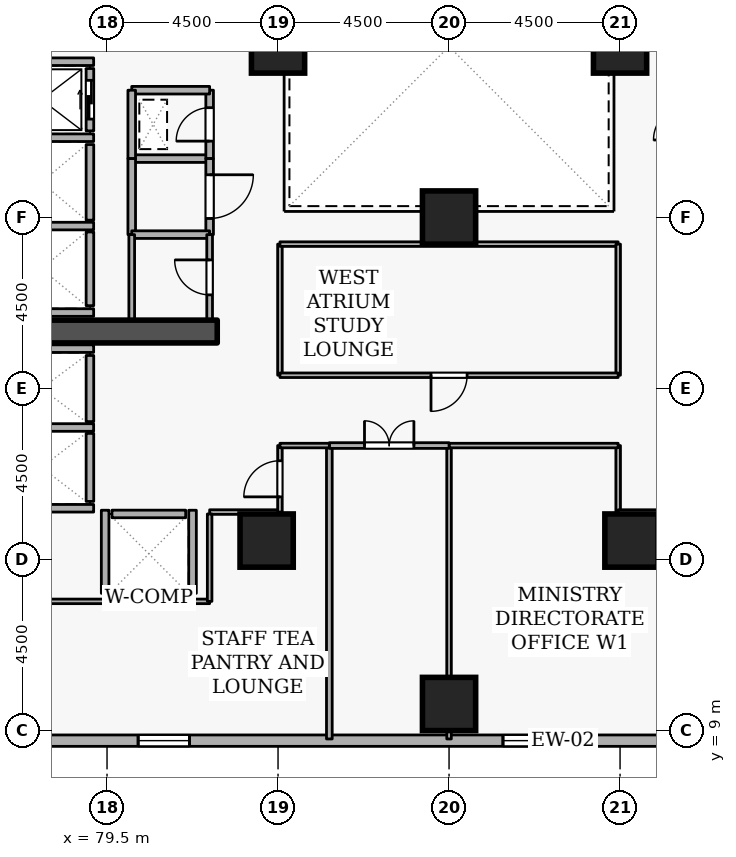
"""IFC4 building model, lengths in metres.
Left out: names, types, materials, properties, quantities, classifications, styles, units other than length and angle.
Written with IfcOpenShell. Run it as: python <this file> out.ifc"""

import sys

from ifc_helpers import new_model, si_unit, direction, frame, frame_2d, origin, origin_2d, place, context, subcontext, project, spatial, rectangle, extrude, element, fill, save


model = new_model("IFC4")
c1 = context("Model", 3, precision=1e-05, world=origin(), true_north=direction((0.0, 1.0)))
c2 = subcontext(c1, "Body", "Model", "MODEL_VIEW")
j1 = project(units=[si_unit("LENGTHUNIT", "METRE"), si_unit("PLANEANGLEUNIT", "RADIAN")], contexts=[c1])
p1 = place(None, origin())
s1 = spatial("IfcSite", under=j1, at=p1, CompositionType="ELEMENT")
p2 = place(p1, origin())
s2 = spatial("IfcBuilding", under=s1, at=p2, CompositionType="ELEMENT")
p3 = place(p2, frame((0.0, 0.0, 68.1)))
s3 = spatial("IfcBuildingStorey", under=s2, at=p3, CompositionType="ELEMENT", Elevation=68.1)
p4 = place(p3, frame((76.7, 19.5, 0.0), z_axis=(0.0, 0.0, 1.0), x_axis=(1.0, 0.0, 0.0)))
e1 = element("IfcWall", 1, at=p4, inside=s3, PredefinedType="SHEAR", context=c2, shape_type="SweptSolid", body=[
    extrude(rectangle(XDim=5.7, YDim=0.6, at=frame_2d((2.85, 0.0))), origin(), (0.0, 0.0, 1.0), 3.6),
])
for number, where, z_axis, x_axis in (
    (2, (88.5, 9.7, 0.0), (0.0, 0.0, 1.0), (1.0, 0.0, 0.0)),
    (3, (93.3, 14.0, 0.0), (0.0, 0.0, 1.0), (1.0, 0.0, 0.0)),
    (4, (83.7, 14.0, 0.0), (0.0, 0.0, 1.0), (1.0, 0.0, 0.0)),
    (5, (93.0, 27.0, 0.0), (0.0, 0.0, 1.0), (1.0, 0.0, 0.0)),
    (6, (84.0, 27.0, 0.0), (0.0, 0.0, 1.0), (1.0, 0.0, 0.0)),
    (7, (88.5, 22.5, 0.0), (0.0, 0.0, 1.0), (1.0, 0.0, 0.0)),
):
    element("IfcColumn", number, at=place(p3, frame(where, z_axis=z_axis, x_axis=x_axis)), inside=s3, PredefinedType="COLUMN", context=c2, shape_type="SweptSolid", body=[
        extrude(rectangle(XDim=1.4, YDim=1.4, at=origin_2d()), origin(), (0.0, 0.0, 1.0), 3.6),
    ])
p5 = place(p3, frame((72.819, 8.735, 0.0), z_axis=(0.0, 0.0, 1.0), x_axis=(1.0, 0.0, 0.0)))
e8 = element("IfcWall", 8, at=p5, inside=s3, PredefinedType="STANDARD", context=c2, shape_type="SweptSolid", body=[
    extrude(rectangle(XDim=37.362, YDim=0.3, at=frame_2d((18.681, 0.0))), origin(), (0.0, 0.0, 1.0), 2.66),
])
p6 = place(p5, frame((7.5, 0.0, 0.72)))
e9 = element("IfcOpeningElement", 9, at=p6, cuts=e8, PredefinedType="OPENING", context=c2, shape_type="SweptSolid", body=[
    extrude(rectangle(XDim=1.35, YDim=1.05, at=frame_2d((0.675, 0.525))), frame((0.0, 0.16, 0.0), z_axis=(0.0, -1.0, 0.0), x_axis=(1.0, 0.0, 0.0)), (0.0, 0.0, 1.0), 0.32),
])
p7 = place(p5, frame((17.1, 0.0, 0.72)))
e10 = element("IfcOpeningElement", 10, at=p7, cuts=e8, PredefinedType="OPENING", context=c2, shape_type="SweptSolid", body=[
    extrude(rectangle(XDim=1.35, YDim=1.05, at=frame_2d((0.675, 0.525))), frame((0.0, 0.16, 0.0), z_axis=(0.0, -1.0, 0.0), x_axis=(1.0, 0.0, 0.0)), (0.0, 0.0, 1.0), 0.32),
])
p8 = place(p5, frame((21.9, 0.0, 0.72)))
e11 = element("IfcOpeningElement", 11, at=p8, cuts=e8, PredefinedType="OPENING", context=c2, shape_type="SweptSolid", body=[
    extrude(rectangle(XDim=1.35, YDim=1.05, at=frame_2d((0.675, 0.525))), frame((0.0, 0.16, 0.0), z_axis=(0.0, -1.0, 0.0), x_axis=(1.0, 0.0, 0.0)), (0.0, 0.0, 1.0), 0.32),
])
p9 = place(p3, frame((79.05, 24.78, 0.0), z_axis=(0.0, 0.0, 1.0), x_axis=(0.0, 1.0, 0.0)))
e12 = element("IfcWall", 12, at=p9, inside=s3, PredefinedType="STANDARD", context=c2, shape_type="SweptSolid", body=[
    extrude(rectangle(XDim=1.64, YDim=0.2, at=frame_2d((0.82, 0.0))), origin(), (0.0, 0.0, 1.0), 3.26),
])
p10 = place(p9, frame((0.31, 0.0, 0.0)))
e13 = element("IfcOpeningElement", 13, at=p10, cuts=e12, PredefinedType="OPENING", context=c2, shape_type="SweptSolid", body=[
    extrude(rectangle(XDim=1.02, YDim=2.06, at=frame_2d((0.51, 1.03))), frame((0.0, 0.11, 0.0), z_axis=(0.0, -1.0, 0.0), x_axis=(1.0, 0.0, 0.0)), (0.0, 0.0, 1.0), 0.22),
])
p11 = place(p3, frame((79.05, 22.43, 0.0), z_axis=(0.0, 0.0, 1.0), x_axis=(0.0, 1.0, 0.0)))
e14 = element("IfcWall", 14, at=p11, inside=s3, PredefinedType="STANDARD", context=c2, shape_type="SweptSolid", body=[
    extrude(rectangle(XDim=1.99, YDim=0.2, at=frame_2d((0.995, 0.0))), origin(), (0.0, 0.0, 1.0), 3.26),
])
p12 = place(p3, frame((79.05, 20.18, 0.0), z_axis=(0.0, 0.0, 1.0), x_axis=(0.0, 1.0, 0.0)))
e15 = element("IfcWall", 15, at=p12, inside=s3, PredefinedType="STANDARD", context=c2, shape_type="SweptSolid", body=[
    extrude(rectangle(XDim=1.94, YDim=0.2, at=frame_2d((0.97, 0.0))), origin(), (0.0, 0.0, 1.0), 3.26),
])
p13 = place(p3, frame((79.05, 17.13, 0.0), z_axis=(0.0, 0.0, 1.0), x_axis=(0.0, 1.0, 0.0)))
e16 = element("IfcWall", 16, at=p13, inside=s3, PredefinedType="STANDARD", context=c2, shape_type="SweptSolid", body=[
    extrude(rectangle(XDim=1.74, YDim=0.2, at=frame_2d((0.87, 0.0))), origin(), (0.0, 0.0, 1.0), 3.26),
])
p14 = place(p3, frame((79.05, 15.03, 0.0), z_axis=(0.0, 0.0, 1.0), x_axis=(0.0, 1.0, 0.0)))
e17 = element("IfcWall", 17, at=p14, inside=s3, PredefinedType="STANDARD", context=c2, shape_type="SweptSolid", body=[
    extrude(rectangle(XDim=1.79, YDim=0.2, at=frame_2d((0.895, 0.0))), origin(), (0.0, 0.0, 1.0), 3.26),
])
p15 = place(p3, frame((79.63, 14.7, 0.0), z_axis=(0.0, 0.0, 1.0), x_axis=(1.0, 0.0, 0.0)))
e18 = element("IfcWall", 18, at=p15, inside=s3, PredefinedType="STANDARD", context=c2, shape_type="SweptSolid", body=[
    extrude(rectangle(XDim=1.94, YDim=0.2, at=frame_2d((0.97, 0.0))), origin(), (0.0, 0.0, 1.0), 3.26),
])
for number, where, z_axis, x_axis in (
    (19, (76.712, 26.6, 0.0), (0.0, 0.0, 1.0), (1.0, 0.0, 0.0)),
    (20, (76.712, 24.6, 0.0), (0.0, 0.0, 1.0), (1.0, 0.0, 0.0)),
    (21, (76.712, 22.275, 0.0), (0.0, 0.0, 1.0), (1.0, 0.0, 0.0)),
    (22, (76.712, 20.0, 0.0), (0.0, 0.0, 1.0), (1.0, 0.0, 0.0)),
):
    element("IfcWall", number, at=place(p3, frame(where, z_axis=z_axis, x_axis=x_axis)), inside=s3, PredefinedType="STANDARD", context=c2, shape_type="SweptSolid", body=[
        extrude(rectangle(XDim=2.436, YDim=0.2, at=frame_2d((1.218, 0.0))), origin(), (0.0, 0.0, 1.0), 3.26),
    ])
p16 = place(p3, frame((76.402, 19.05, 0.0), z_axis=(0.0, 0.0, 1.0), x_axis=(1.0, 0.0, 0.0)))
e23 = element("IfcWall", 23, at=p16, inside=s3, PredefinedType="STANDARD", context=c2, shape_type="SweptSolid", body=[
    extrude(rectangle(XDim=2.746, YDim=0.2, at=frame_2d((1.373, 0.0))), origin(), (0.0, 0.0, 1.0), 2.465),
])
p17 = place(p3, frame((76.402, 16.975, 0.0), z_axis=(0.0, 0.0, 1.0), x_axis=(1.0, 0.0, 0.0)))
e24 = element("IfcWall", 24, at=p17, inside=s3, PredefinedType="STANDARD", context=c2, shape_type="SweptSolid", body=[
    extrude(rectangle(XDim=2.746, YDim=0.2, at=frame_2d((1.373, 0.0))), origin(), (0.0, 0.0, 1.0), 3.26),
])
p18 = place(p3, frame((76.512, 14.85, 0.0), z_axis=(0.0, 0.0, 1.0), x_axis=(1.0, 0.0, 0.0)))
e25 = element("IfcWall", 25, at=p18, inside=s3, PredefinedType="STANDARD", context=c2, shape_type="SweptSolid", body=[
    extrude(rectangle(XDim=2.636, YDim=0.2, at=frame_2d((1.318, 0.0))), origin(), (0.0, 0.0, 1.0), 3.26),
])
p19 = place(p3, frame((79.452, 12.5, 0.0), z_axis=(0.0, 0.0, 1.0), x_axis=(1.0, 0.0, 0.0)))
e26 = element("IfcWall", 26, at=p19, inside=s3, PredefinedType="STANDARD", context=c2, shape_type="SweptSolid", body=[
    extrude(rectangle(XDim=2.296, YDim=0.2, at=frame_2d((1.148, 0.0))), origin(), (0.0, 0.0, 1.0), 3.26),
])
for number, where, z_axis, x_axis in (
    (27, (81.75, 12.612, 0.0), (0.0, 0.0, 1.0), (0.0, 1.0, 0.0)),
    (28, (79.45, 12.612, 0.0), (0.0, 0.0, 1.0), (0.0, 1.0, 0.0)),
):
    element("IfcWall", number, at=place(p3, frame(where, z_axis=z_axis, x_axis=x_axis)), inside=s3, PredefinedType="STANDARD", context=c2, shape_type="SweptSolid", body=[
        extrude(rectangle(XDim=2.186, YDim=0.2, at=frame_2d((1.093, 0.0))), origin(), (0.0, 0.0, 1.0), 3.26),
    ])
p20 = place(p3, frame((80.15, 24.05, 0.0), z_axis=(0.0, 0.0, 1.0), x_axis=(1.0, 0.0, 0.0)))
e29 = element("IfcWall", 29, at=p20, inside=s3, PredefinedType="STANDARD", context=c2, shape_type="SweptSolid", body=[
    extrude(rectangle(XDim=2.05, YDim=0.2, at=frame_2d((1.025, 0.0))), origin(), (0.0, 0.0, 1.0), 3.26),
])
p21 = place(p3, frame((82.2, 24.05, 0.0), z_axis=(0.0, 0.0, 1.0), x_axis=(0.0, 1.0, 0.0)))
e30 = element("IfcWall", 30, at=p21, inside=s3, PredefinedType="STANDARD", context=c2, shape_type="SweptSolid", body=[
    extrude(rectangle(XDim=1.8, YDim=0.2, at=frame_2d((0.9, 0.0))), origin(), (0.0, 0.0, 1.0), 3.26),
])
p22 = place(p21, frame((0.46, 0.0, 0.0)))
e31 = element("IfcOpeningElement", 31, at=p22, cuts=e30, PredefinedType="OPENING", context=c2, shape_type="SweptSolid", body=[
    extrude(rectangle(XDim=0.88, YDim=2.04, at=frame_2d((0.44, 1.02))), frame((0.0, 0.11, 0.0), z_axis=(0.0, -1.0, 0.0), x_axis=(1.0, 0.0, 0.0)), (0.0, 0.0, 1.0), 0.22),
])
p23 = place(p3, frame((82.2, 25.85, 0.0), z_axis=(0.0, 0.0, 1.0), x_axis=(-1.0, 0.0, 0.0)))
e32 = element("IfcWall", 32, at=p23, inside=s3, PredefinedType="STANDARD", context=c2, shape_type="SweptSolid", body=[
    extrude(rectangle(XDim=2.05, YDim=0.2, at=frame_2d((1.025, 0.0))), origin(), (0.0, 0.0, 1.0), 3.26),
])
p24 = place(p3, frame((80.15, 25.85, 0.0), z_axis=(0.0, 0.0, 1.0), x_axis=(0.0, -1.0, 0.0)))
e33 = element("IfcWall", 33, at=p24, inside=s3, PredefinedType="STANDARD", context=c2, shape_type="SweptSolid", body=[
    extrude(rectangle(XDim=1.8, YDim=0.2, at=frame_2d((0.9, 0.0))), origin(), (0.0, 0.0, 1.0), 3.26),
])
p25 = place(p3, frame((80.15, 22.05, 0.0), z_axis=(0.0, 0.0, 1.0), x_axis=(0.0, 1.0, 0.0)))
e34 = element("IfcWall", 34, at=p25, inside=s3, PredefinedType="STANDARD", context=c2, shape_type="SweptSolid", body=[
    extrude(rectangle(XDim=2.0, YDim=0.2, at=frame_2d((1.0, 0.0))), origin(), (0.0, 0.0, 1.0), 3.26),
])
p26 = place(p3, frame((82.2, 24.05, 0.0), z_axis=(0.0, 0.0, 1.0), x_axis=(0.0, -1.0, 0.0)))
e35 = element("IfcWall", 35, at=p26, inside=s3, PredefinedType="STANDARD", context=c2, shape_type="SweptSolid", body=[
    extrude(rectangle(XDim=2.0, YDim=0.2, at=frame_2d((1.0, 0.0))), origin(), (0.0, 0.0, 1.0), 3.26),
])
p27 = place(p26, frame((0.425, 0.0, 0.0)))
e36 = element("IfcOpeningElement", 36, at=p27, cuts=e35, PredefinedType="OPENING", context=c2, shape_type="SweptSolid", body=[
    extrude(rectangle(XDim=1.15, YDim=2.1, at=frame_2d((0.575, 1.05))), frame((0.0, 0.11, 0.0), z_axis=(0.0, -1.0, 0.0), x_axis=(1.0, 0.0, 0.0)), (0.0, 0.0, 1.0), 0.22),
])
p28 = place(p3, frame((82.2, 22.05, 0.0), z_axis=(0.0, 0.0, 1.0), x_axis=(-1.0, 0.0, 0.0)))
e37 = element("IfcWall", 37, at=p28, inside=s3, PredefinedType="STANDARD", context=c2, shape_type="SweptSolid", body=[
    extrude(rectangle(XDim=2.05, YDim=0.2, at=frame_2d((1.025, 0.0))), origin(), (0.0, 0.0, 1.0), 3.26),
])
p29 = place(p3, frame((82.2, 19.8, 0.0), z_axis=(0.0, 0.0, 1.0), x_axis=(0.0, 1.0, 0.0)))
e38 = element("IfcWall", 38, at=p29, inside=s3, PredefinedType="PARTITIONING", context=c2, shape_type="SweptSolid", body=[
    extrude(rectangle(XDim=2.25, YDim=0.15, at=frame_2d((1.125, 0.0))), origin(), (0.0, 0.0, 1.0), 3.26),
])
p30 = place(p29, frame((0.665, 0.0, 0.0)))
e39 = element("IfcOpeningElement", 39, at=p30, cuts=e38, PredefinedType="OPENING", context=c2, shape_type="SweptSolid", body=[
    extrude(rectangle(XDim=0.92, YDim=2.08, at=frame_2d((0.46, 1.04))), frame((0.0, 0.085, 0.0), z_axis=(0.0, -1.0, 0.0), x_axis=(1.0, 0.0, 0.0)), (0.0, 0.0, 1.0), 0.17),
])
p31 = place(p3, frame((80.15, 22.05, 0.0), z_axis=(0.0, 0.0, 1.0), x_axis=(0.0, -1.0, 0.0)))
e40 = element("IfcWall", 40, at=p31, inside=s3, PredefinedType="PARTITIONING", context=c2, shape_type="SweptSolid", body=[
    extrude(rectangle(XDim=2.25, YDim=0.15, at=frame_2d((1.125, 0.0))), origin(), (0.0, 0.0, 1.0), 3.26),
])
p32 = place(p3, frame((92.95, 16.5, 0.0), z_axis=(0.0, 0.0, 1.0), x_axis=(0.0, -1.0, 0.0)))
e41 = element("IfcWall", 41, at=p32, inside=s3, PredefinedType="PARTITIONING", context=c2, shape_type="SweptSolid", body=[
    extrude(rectangle(XDim=1.75, YDim=0.12, at=frame_2d((0.875, 0.0))), origin(), (0.0, 0.0, 1.0), 3.26),
])
p33 = place(p3, frame((92.95, 14.75, 0.0), z_axis=(0.0, 0.0, 1.0), x_axis=(1.0, 0.0, 0.0)))
e42 = element("IfcWall", 42, at=p33, inside=s3, PredefinedType="PARTITIONING", context=c2, shape_type="SweptSolid", body=[
    extrude(rectangle(XDim=1.85, YDim=0.12, at=frame_2d((0.925, 0.0))), origin(), (0.0, 0.0, 1.0), 3.26),
])
p34 = place(p3, frame((88.5, 8.78, 0.0), z_axis=(0.0, 0.0, 1.0), x_axis=(0.0, 1.0, 0.0)))
e43 = element("IfcWall", 43, at=p34, inside=s3, PredefinedType="PARTITIONING", context=c2, shape_type="SweptSolid", body=[
    extrude(rectangle(XDim=7.72, YDim=0.12, at=frame_2d((3.86, 0.0))), origin(), (0.0, 0.0, 1.0), 2.798),
])
p35 = place(p3, frame((88.5, 16.5, 0.0), z_axis=(0.0, 0.0, 1.0), x_axis=(1.0, 0.0, 0.0)))
e44 = element("IfcWall", 44, at=p35, inside=s3, PredefinedType="PARTITIONING", context=c2, shape_type="SweptSolid", body=[
    extrude(rectangle(XDim=4.45, YDim=0.12, at=frame_2d((2.225, 0.0))), origin(), (0.0, 0.0, 1.0), 3.26),
])
p36 = place(p3, frame((85.35, 8.78, 0.0), z_axis=(0.0, 0.0, 1.0), x_axis=(0.0, 1.0, 0.0)))
e45 = element("IfcWall", 45, at=p36, inside=s3, PredefinedType="PARTITIONING", context=c2, shape_type="SweptSolid", body=[
    extrude(rectangle(XDim=7.72, YDim=0.15, at=frame_2d((3.86, 0.0))), origin(), (0.0, 0.0, 1.0), 3.26),
])
p37 = place(p3, frame((85.35, 16.5, 0.0), z_axis=(0.0, 0.0, 1.0), x_axis=(1.0, 0.0, 0.0)))
e46 = element("IfcWall", 46, at=p37, inside=s3, PredefinedType="PARTITIONING", context=c2, shape_type="SweptSolid", body=[
    extrude(rectangle(XDim=3.15, YDim=0.15, at=frame_2d((1.575, 0.0))), origin(), (0.0, 0.0, 1.0), 3.26),
])
p38 = place(p37, frame((0.925, 0.0, 0.0)))
e47 = element("IfcOpeningElement", 47, at=p38, cuts=e46, PredefinedType="OPENING", context=c2, shape_type="SweptSolid", body=[
    extrude(rectangle(XDim=1.3, YDim=2.12, at=frame_2d((0.65, 1.06))), frame((0.0, 0.085, 0.0), z_axis=(0.0, -1.0, 0.0), x_axis=(1.0, 0.0, 0.0)), (0.0, 0.0, 1.0), 0.17),
])
p39 = place(p3, frame((82.2, 14.75, 0.0), z_axis=(0.0, 0.0, 1.0), x_axis=(1.0, 0.0, 0.0)))
e48 = element("IfcWall", 48, at=p39, inside=s3, PredefinedType="PARTITIONING", context=c2, shape_type="SweptSolid", body=[
    extrude(rectangle(XDim=1.85, YDim=0.12, at=frame_2d((0.925, 0.0))), origin(), (0.0, 0.0, 1.0), 3.26),
])
p40 = place(p3, frame((84.05, 14.75, 0.0), z_axis=(0.0, 0.0, 1.0), x_axis=(0.0, 1.0, 0.0)))
e49 = element("IfcWall", 49, at=p40, inside=s3, PredefinedType="PARTITIONING", context=c2, shape_type="SweptSolid", body=[
    extrude(rectangle(XDim=1.75, YDim=0.12, at=frame_2d((0.875, 0.0))), origin(), (0.0, 0.0, 1.0), 3.26),
])
p41 = place(p40, frame((0.4, 0.0, 0.0)))
e50 = element("IfcOpeningElement", 50, at=p41, cuts=e49, PredefinedType="OPENING", context=c2, shape_type="SweptSolid", body=[
    extrude(rectangle(XDim=0.95, YDim=2.1, at=frame_2d((0.475, 1.05))), frame((0.0, 0.07, 0.0), z_axis=(0.0, -1.0, 0.0), x_axis=(1.0, 0.0, 0.0)), (0.0, 0.0, 1.0), 0.14),
])
p42 = place(p3, frame((84.05, 16.5, 0.0), z_axis=(0.0, 0.0, 1.0), x_axis=(1.0, 0.0, 0.0)))
e51 = element("IfcWall", 51, at=p42, inside=s3, PredefinedType="PARTITIONING", context=c2, shape_type="SweptSolid", body=[
    extrude(rectangle(XDim=1.3, YDim=0.12, at=frame_2d((0.65, 0.0))), origin(), (0.0, 0.0, 1.0), 3.26),
])
p43 = place(p3, frame((70.28, 12.4, 0.0), z_axis=(0.0, 0.0, 1.0), x_axis=(1.0, 0.0, 0.0)))
e52 = element("IfcWall", 52, at=p43, inside=s3, PredefinedType="PARTITIONING", context=c2, shape_type="SweptSolid", body=[
    extrude(rectangle(XDim=9.172, YDim=0.12, at=frame_2d((4.586, 0.0))), origin(), (0.0, 0.0, 1.0), 3.26),
])
p44 = place(p3, frame((81.748, 12.4, 0.0), z_axis=(0.0, 0.0, 1.0), x_axis=(1.0, 0.0, 0.0)))
e53 = element("IfcWall", 53, at=p44, inside=s3, PredefinedType="PARTITIONING", context=c2, shape_type="SweptSolid", body=[
    extrude(rectangle(XDim=0.452, YDim=0.12, at=frame_2d((0.226, 0.0))), origin(), (0.0, 0.0, 1.0), 3.26),
])
p45 = place(p3, frame((82.2, 12.4, 0.0), z_axis=(0.0, 0.0, 1.0), x_axis=(0.0, 1.0, 0.0)))
e54 = element("IfcWall", 54, at=p45, inside=s3, PredefinedType="PARTITIONING", context=c2, shape_type="SweptSolid", body=[
    extrude(rectangle(XDim=2.3, YDim=0.12, at=frame_2d((1.15, 0.0))), origin(), (0.0, 0.0, 1.0), 3.26),
])
p46 = place(p3, frame((84.05, 18.35, 0.0), z_axis=(0.0, 0.0, 1.0), x_axis=(0.0, 1.0, 0.0)))
e55 = element("IfcWall", 55, at=p46, inside=s3, PredefinedType="PARTITIONING", context=c2, shape_type="SweptSolid", body=[
    extrude(rectangle(XDim=3.45, YDim=0.12, at=frame_2d((1.725, 0.0))), origin(), (0.0, 0.0, 1.0), 3.26),
])
p47 = place(p3, frame((84.05, 21.8, 0.0), z_axis=(0.0, 0.0, 1.0), x_axis=(1.0, 0.0, 0.0)))
e56 = element("IfcWall", 56, at=p47, inside=s3, PredefinedType="PARTITIONING", context=c2, shape_type="SweptSolid", body=[
    extrude(rectangle(XDim=8.9, YDim=0.12, at=frame_2d((4.45, 0.0))), origin(), (0.0, 0.0, 1.0), 3.26),
])
p48 = place(p3, frame((92.95, 21.8, 0.0), z_axis=(0.0, 0.0, 1.0), x_axis=(0.0, -1.0, 0.0)))
e57 = element("IfcWall", 57, at=p48, inside=s3, PredefinedType="PARTITIONING", context=c2, shape_type="SweptSolid", body=[
    extrude(rectangle(XDim=3.45, YDim=0.12, at=frame_2d((1.725, 0.0))), origin(), (0.0, 0.0, 1.0), 3.26),
])
p49 = place(p3, frame((92.95, 18.35, 0.0), z_axis=(0.0, 0.0, 1.0), x_axis=(-1.0, 0.0, 0.0)))
e58 = element("IfcWall", 58, at=p49, inside=s3, PredefinedType="PARTITIONING", context=c2, shape_type="SweptSolid", body=[
    extrude(rectangle(XDim=8.9, YDim=0.12, at=frame_2d((4.45, 0.0))), origin(), (0.0, 0.0, 1.0), 3.26),
])
p50 = place(p49, frame((3.975, 0.0, 0.0)))
e59 = element("IfcOpeningElement", 59, at=p50, cuts=e58, PredefinedType="OPENING", context=c2, shape_type="SweptSolid", body=[
    extrude(rectangle(XDim=0.95, YDim=2.1, at=frame_2d((0.475, 1.05))), frame((0.0, 0.07, 0.0), z_axis=(0.0, -1.0, 0.0), x_axis=(1.0, 0.0, 0.0)), (0.0, 0.0, 1.0), 0.14),
])
p51 = place(p6, origin())
e60 = element("IfcWindow", 60, at=p51, inside=s3, PartitioningType="SINGLE_PANEL", PredefinedType="WINDOW", context=c2, shape_type="SweptSolid", body=[
    extrude(rectangle(XDim=1.35, YDim=1.05, at=frame_2d((0.675, 0.525))), frame((0.0, 0.03, 0.0), z_axis=(0.0, -1.0, 0.0), x_axis=(1.0, 0.0, 0.0)), (0.0, 0.0, 1.0), 0.06),
])
fill(e9, e60)
p52 = place(p7, origin())
e61 = element("IfcWindow", 61, at=p52, inside=s3, PartitioningType="SINGLE_PANEL", PredefinedType="WINDOW", context=c2, shape_type="SweptSolid", body=[
    extrude(rectangle(XDim=1.35, YDim=1.05, at=frame_2d((0.675, 0.525))), frame((0.0, 0.03, 0.0), z_axis=(0.0, -1.0, 0.0), x_axis=(1.0, 0.0, 0.0)), (0.0, 0.0, 1.0), 0.06),
])
fill(e10, e61)
p53 = place(p10, origin())
e62 = element("IfcDoor", 62, at=p53, inside=s3, OperationType="SLIDING_TO_LEFT", PredefinedType="DOOR", context=c2, shape_type="SweptSolid", body=[
    extrude(rectangle(XDim=1.02, YDim=2.06, at=frame_2d((0.51, 1.03))), frame((0.0, 0.025, 0.0), z_axis=(0.0, -1.0, 0.0), x_axis=(1.0, 0.0, 0.0)), (0.0, 0.0, 1.0), 0.05),
])
fill(e13, e62)
p54 = place(p22, origin())
e63 = element("IfcDoor", 63, at=p54, inside=s3, OperationType="SINGLE_SWING_LEFT", PredefinedType="DOOR", context=c2, shape_type="SweptSolid", body=[
    extrude(rectangle(XDim=0.88, YDim=2.04, at=frame_2d((0.44, 1.02))), frame((0.0, 0.025, 0.0), z_axis=(0.0, -1.0, 0.0), x_axis=(1.0, 0.0, 0.0)), (0.0, 0.0, 1.0), 0.05),
])
fill(e31, e63)
p55 = place(p30, origin())
e64 = element("IfcDoor", 64, at=p55, inside=s3, OperationType="SINGLE_SWING_RIGHT", PredefinedType="DOOR", context=c2, shape_type="SweptSolid", body=[
    extrude(rectangle(XDim=0.92, YDim=2.08, at=frame_2d((0.46, 1.04))), frame((0.0, 0.025, 0.0), z_axis=(0.0, -1.0, 0.0), x_axis=(1.0, 0.0, 0.0)), (0.0, 0.0, 1.0), 0.05),
])
fill(e39, e64)
p56 = place(p27, origin())
e65 = element("IfcDoor", 65, at=p56, inside=s3, OperationType="SINGLE_SWING_LEFT", PredefinedType="DOOR", context=c2, shape_type="SweptSolid", body=[
    extrude(rectangle(XDim=1.15, YDim=2.1, at=frame_2d((0.575, 1.05))), frame((0.0, 0.025, 0.0), z_axis=(0.0, -1.0, 0.0), x_axis=(1.0, 0.0, 0.0)), (0.0, 0.0, 1.0), 0.05),
])
fill(e36, e65)
p57 = place(p38, origin())
e66 = element("IfcDoor", 66, at=p57, inside=s3, OperationType="DOUBLE_DOOR_SINGLE_SWING", PredefinedType="DOOR", context=c2, shape_type="SweptSolid", body=[
    extrude(rectangle(XDim=1.3, YDim=2.12, at=frame_2d((0.65, 1.06))), frame((0.0, 0.025, 0.0), z_axis=(0.0, -1.0, 0.0), x_axis=(1.0, 0.0, 0.0)), (0.0, 0.0, 1.0), 0.05),
])
fill(e47, e66)
p58 = place(p41, origin())
e67 = element("IfcDoor", 67, at=p58, inside=s3, OperationType="SINGLE_SWING_LEFT", PredefinedType="DOOR", context=c2, shape_type="SweptSolid", body=[
    extrude(rectangle(XDim=0.95, YDim=2.1, at=frame_2d((0.475, 1.05))), frame((0.0, 0.025, 0.0), z_axis=(0.0, -1.0, 0.0), x_axis=(1.0, 0.0, 0.0)), (0.0, 0.0, 1.0), 0.05),
])
fill(e50, e67)
p59 = place(p50, origin())
e68 = element("IfcDoor", 68, at=p59, inside=s3, OperationType="SINGLE_SWING_RIGHT", PredefinedType="DOOR", context=c2, shape_type="SweptSolid", body=[
    extrude(rectangle(XDim=0.95, YDim=2.1, at=frame_2d((0.475, 1.05))), frame((0.0, 0.025, 0.0), z_axis=(0.0, -1.0, 0.0), x_axis=(1.0, 0.0, 0.0)), (0.0, 0.0, 1.0), 0.05),
])
fill(e59, e68)
save(model, sys.argv[1])
